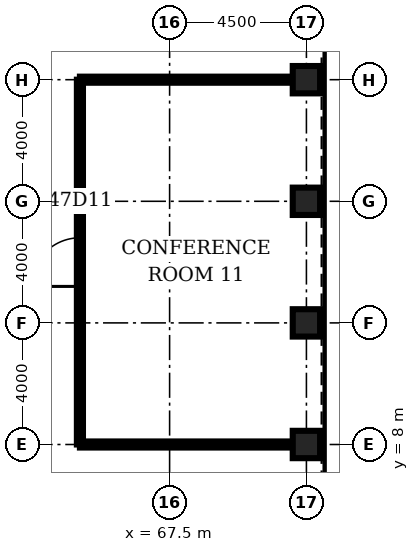
"""IFC4 building model, lengths in metres.
Left out: names, types, materials, properties, quantities, classifications, styles, units other than length and angle.
Written with IfcOpenShell. Run it as: python <this file> out.ifc"""

import sys

from ifc_helpers import new_model, si_unit, direction, frame, frame_2d, origin, origin_2d, place, context, subcontext, project, spatial, rectangle, hollow_rectangle, extrude, element, fill, save


model = new_model("IFC4")
c1 = context("Model", 3, precision=1e-05, world=origin(), true_north=direction((0.0, 1.0)))
c2 = subcontext(c1, "Body", "Model", "MODEL_VIEW")
j1 = project(units=[si_unit("LENGTHUNIT", "METRE"), si_unit("PLANEANGLEUNIT", "RADIAN")], contexts=[c1])
p1 = place(None, origin())
s1 = spatial("IfcSite", under=j1, at=p1, CompositionType="ELEMENT")
p2 = place(p1, origin())
s2 = spatial("IfcBuilding", under=s1, at=p2, CompositionType="ELEMENT")
p3 = place(p2, frame((0.0, 0.0, 211.0)))
s3 = spatial("IfcBuildingStorey", under=s2, at=p3, CompositionType="ELEMENT", Elevation=211.0)
for number, where, z_axis, x_axis in (
    (1, (72.0, 8.0, 0.0), (0.0, 0.0, 1.0), (1.0, 0.0, 0.0)),
    (2, (72.0, 12.0, 0.0), (0.0, 0.0, 1.0), (1.0, 0.0, 0.0)),
    (3, (72.0, 16.0, 0.0), (0.0, 0.0, 1.0), (1.0, 0.0, 0.0)),
    (4, (72.0, 20.0, 0.0), (0.0, 0.0, 1.0), (1.0, 0.0, 0.0)),
):
    element("IfcColumn", number, at=place(p3, frame(where, z_axis=z_axis, x_axis=x_axis)), inside=s3, PredefinedType="COLUMN", context=c2, shape_type="SweptSolid", body=[
        extrude(hollow_rectangle(XDim=0.9, YDim=0.9, WallThickness=0.08, at=origin_2d()), origin(), (0.0, 0.0, 1.0), 4.2),
    ])
for number, where, z_axis, x_axis in (
    (5, (64.55, 8.0, 0.0), (0.0, 0.0, 1.0), (1.0, 0.0, 0.0)),
    (6, (64.55, 20.0, 0.0), (0.0, 0.0, 1.0), (1.0, 0.0, 0.0)),
):
    element("IfcWall", number, at=place(p3, frame(where, z_axis=z_axis, x_axis=x_axis)), inside=s3, PredefinedType="PARTITIONING", context=c2, shape_type="SweptSolid", body=[
        extrude(rectangle(XDim=7.0, YDim=0.2, at=frame_2d((3.5, 0.0))), origin(), (0.0, 0.0, 1.0), 3.0),
    ])
p4 = place(p3, frame((64.55, 8.0, 0.0), z_axis=(0.0, 0.0, 1.0), x_axis=(0.0, 1.0, 0.0)))
e7 = element("IfcWall", 7, at=p4, inside=s3, PredefinedType="PARTITIONING", context=c2, shape_type="SweptSolid", body=[
    extrude(rectangle(XDim=12.0, YDim=0.2, at=frame_2d((6.0, 0.0))), origin(), (0.0, 0.0, 1.0), 3.0),
])
p5 = place(p4, frame((5.2, 0.0, 0.0)))
e8 = element("IfcOpeningElement", 8, at=p5, cuts=e7, PredefinedType="OPENING", context=c2, shape_type="SweptSolid", body=[
    extrude(rectangle(XDim=1.6, YDim=2.1, at=frame_2d((0.8, 1.05))), frame((0.0, 0.11, 0.0), z_axis=(0.0, -1.0, 0.0), x_axis=(1.0, 0.0, 0.0)), (0.0, 0.0, 1.0), 0.22),
])
p6 = place(p5, origin())
e9 = element("IfcDoor", 9, at=p6, inside=s3, OperationType="SINGLE_SWING_LEFT", PredefinedType="DOOR", context=c2, shape_type="SweptSolid", body=[
    extrude(rectangle(XDim=1.6, YDim=2.1, at=frame_2d((0.8, 1.05))), frame((0.0, 0.025, 0.0), z_axis=(0.0, -1.0, 0.0), x_axis=(1.0, 0.0, 0.0)), (0.0, 0.0, 1.0), 0.05),
])
fill(e8, e9)
save(model, sys.argv[1])
